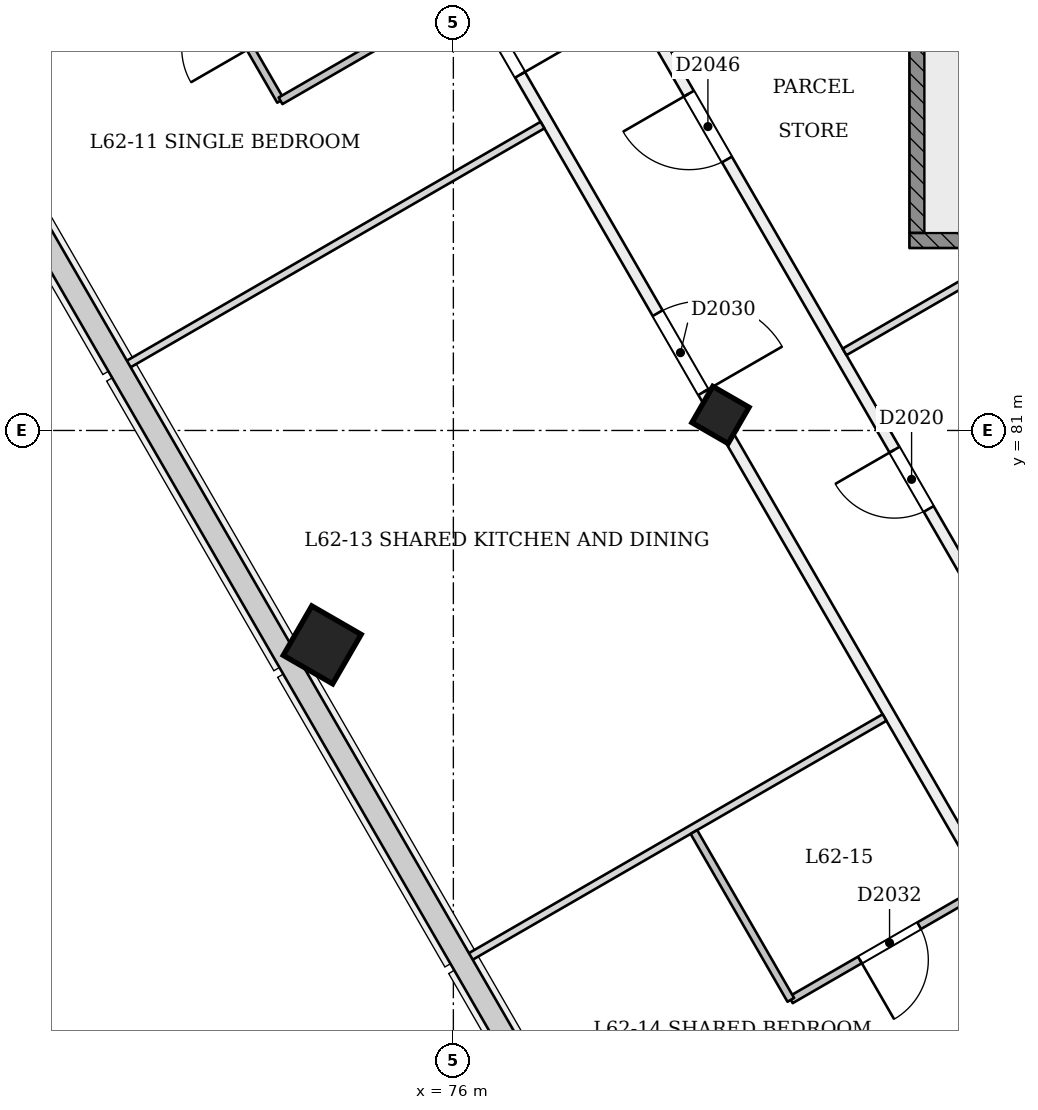
"""IFC4 building model, lengths in metres.
Left out: names, types, materials, properties, quantities, classifications, styles, units other than length and angle.
Written with IfcOpenShell. Run it as: python <this file> out.ifc"""

import sys

from ifc_helpers import new_model, si_unit, direction, frame, frame_2d, origin, origin_2d, place, context, subcontext, project, spatial, rectangle, extrude, element, fill, save


model = new_model("IFC4")
c1 = context("Model", 3, precision=1e-05, world=origin(), true_north=direction((0.0, 1.0)))
c2 = subcontext(c1, "Body", "Model", "MODEL_VIEW")
j1 = project(units=[si_unit("LENGTHUNIT", "METRE"), si_unit("PLANEANGLEUNIT", "RADIAN")], contexts=[c1])
p1 = place(None, origin())
s1 = spatial("IfcSite", under=j1, at=p1, CompositionType="ELEMENT")
p2 = place(p1, origin())
s2 = spatial("IfcBuilding", under=s1, at=p2, CompositionType="ELEMENT")
p3 = place(p2, frame((0.0, 0.0, 242.8)))
s3 = spatial("IfcBuildingStorey", under=s2, at=p3, CompositionType="ELEMENT", Elevation=242.8)
p4 = place(p3, frame((79.487, 81.157, -0.017), z_axis=(0.022153634206, 0.038480930364, 0.999013730882), x_axis=(-0.864982441191, -0.500326600935, 0.038453463149)))
e1 = element("IfcColumn", 1, at=p4, inside=s3, PredefinedType="COLUMN", context=c2, shape_type="SweptSolid", body=[
    extrude(rectangle(XDim=0.55, YDim=0.55, at=origin_2d()), origin(), (0.0, 0.0, 1.0), 3.604),
])
p5 = place(p3, frame((74.248, 78.132, -0.023), z_axis=(0.022222910879, 0.038415824599, 0.999014697916), x_axis=(-0.866024024967, -0.498522986901, 0.038434616057)))
e2 = element("IfcColumn", 2, at=p5, inside=s3, PredefinedType="COLUMN", context=c2, shape_type="SweptSolid", body=[
    extrude(rectangle(XDim=0.75, YDim=0.75, at=origin_2d()), origin(), (0.0, 0.0, 1.0), 3.604),
])
p6 = place(p3, frame((74.036, 90.6, 0.0), z_axis=(0.0, 0.0, 1.0), x_axis=(0.500001028902, -0.866024809747, 0.0)))
e3 = element("IfcWall", 3, at=p6, inside=s3, PredefinedType="PARTITIONING", context=c2, shape_type="SweptSolid", body=[
    extrude(rectangle(XDim=21.798, YDim=0.15, at=frame_2d((10.899, 0.0))), origin(), (0.0, 0.0, 1.0), 2.8),
])
p7 = place(p6, frame((4.682, 0.0, 0.0)))
e4 = element("IfcOpeningElement", 4, at=p7, cuts=e3, PredefinedType="OPENING", context=c2, shape_type="SweptSolid", body=[
    extrude(rectangle(XDim=1.0, YDim=2.1, at=frame_2d((0.5, 1.05))), frame((0.0, 0.085, 0.0), z_axis=(0.0, -1.0, 0.0), x_axis=(1.0, 0.0, 0.0)), (0.0, 0.0, 1.0), 0.171),
])
p8 = place(p6, frame((9.303, 0.0, 0.0)))
e5 = element("IfcOpeningElement", 5, at=p8, cuts=e3, PredefinedType="OPENING", context=c2, shape_type="SweptSolid", body=[
    extrude(rectangle(XDim=1.2, YDim=2.1, at=frame_2d((0.6, 1.05))), frame((0.0, 0.085, 0.0), z_axis=(0.0, -1.0, 0.0), x_axis=(1.0, 0.0, 0.0)), (0.0, 0.0, 1.0), 0.171),
])
p9 = place(p6, frame((18.298, 0.0, 0.0)))
e6 = element("IfcOpeningElement", 6, at=p9, cuts=e3, PredefinedType="OPENING", context=c2, shape_type="SweptSolid", body=[
    extrude(rectangle(XDim=1.0, YDim=2.1, at=frame_2d((0.5, 1.05))), frame((0.0, 0.085, 0.0), z_axis=(0.0, -1.0, 0.0), x_axis=(1.0, 0.0, 0.0)), (0.0, 0.0, 1.0), 0.171),
])
p10 = place(p6, frame((20.15, 0.0, 0.0)))
e7 = element("IfcOpeningElement", 7, at=p10, cuts=e3, PredefinedType="OPENING", context=c2, shape_type="SweptSolid", body=[
    extrude(rectangle(XDim=1.2, YDim=2.1, at=frame_2d((0.6, 1.05))), frame((0.0, 0.085, 0.0), z_axis=(0.0, -1.0, 0.0), x_axis=(1.0, 0.0, 0.0)), (0.0, 0.0, 1.0), 0.171),
])
p11 = place(p3, frame((85.0, 75.21, 0.0), z_axis=(0.0, 0.0, 1.0), x_axis=(-0.499995580497, 0.866027955371, 0.0)))
e8 = element("IfcWall", 8, at=p11, inside=s3, PredefinedType="PARTITIONING", context=c2, shape_type="SweptSolid", body=[
    extrude(rectangle(XDim=17.771, YDim=0.15, at=frame_2d((8.885, 0.0))), origin(), (0.0, 0.0, 1.0), 3.2),
])
p12 = place(p11, frame((14.767, 0.0, 0.0)))
e9 = element("IfcOpeningElement", 9, at=p12, cuts=e8, PredefinedType="OPENING", context=c2, shape_type="SweptSolid", body=[
    extrude(rectangle(XDim=0.9, YDim=2.1, at=frame_2d((0.45, 1.05))), frame((0.0, 0.085, 0.0), z_axis=(0.0, -1.0, 0.0), x_axis=(1.0, 0.0, 0.0)), (0.0, 0.0, 1.0), 0.171),
])
p13 = place(p11, frame((5.493, 0.0, 0.0)))
e10 = element("IfcOpeningElement", 10, at=p13, cuts=e8, PredefinedType="OPENING", context=c2, shape_type="SweptSolid", body=[
    extrude(rectangle(XDim=0.9, YDim=2.1, at=frame_2d((0.45, 1.05))), frame((0.0, 0.085, 0.0), z_axis=(0.0, -1.0, 0.0), x_axis=(1.0, 0.0, 0.0)), (0.0, 0.0, 1.0), 0.171),
])
p14 = place(p11, frame((2.278, 0.0, 0.0)))
e11 = element("IfcOpeningElement", 11, at=p14, cuts=e8, PredefinedType="OPENING", context=c2, shape_type="SweptSolid", body=[
    extrude(rectangle(XDim=1.0, YDim=2.1, at=frame_2d((0.5, 1.05))), frame((0.0, 0.085, 0.0), z_axis=(0.0, -1.0, 0.0), x_axis=(1.0, 0.0, 0.0)), (0.0, 0.0, 1.0), 0.171),
])
p15 = place(p11, frame((10.802, 0.0, 0.0)))
e12 = element("IfcOpeningElement", 12, at=p15, cuts=e8, PredefinedType="OPENING", context=c2, shape_type="SweptSolid", body=[
    extrude(rectangle(XDim=1.0, YDim=2.1, at=frame_2d((0.5, 1.05))), frame((0.0, 0.085, 0.0), z_axis=(0.0, -1.0, 0.0), x_axis=(1.0, 0.0, 0.0)), (0.0, 0.0, 1.0), 0.171),
])
p16 = place(p3, frame((83.513, 83.4, 0.0), z_axis=(0.0, 0.0, 1.0), x_axis=(-0.866068024448, -0.499926171578, 0.0)))
e13 = element("IfcWall", 13, at=p16, inside=s3, PredefinedType="PARTITIONING", context=c2, shape_type="SweptSolid", body=[
    extrude(rectangle(XDim=2.732, YDim=0.1, at=frame_2d((1.366, 0.0))), origin(), (0.0, 0.0, 1.0), 3.2),
])
p17 = place(p3, frame((73.726, 85.337, 0.0), z_axis=(0.0, 0.0, 1.0), x_axis=(-0.500004234368, 0.866022959057, 0.0)))
e14 = element("IfcWall", 14, at=p17, inside=s3, PredefinedType="PARTITIONING", context=c2, shape_type="SweptSolid", body=[
    extrude(rectangle(XDim=5.0, YDim=0.1, at=frame_2d((2.5, 0.0))), origin(), (0.0, 0.0, 1.0), 2.8),
])
p18 = place(p17, frame((3.253, 0.0, 0.0)))
e15 = element("IfcOpeningElement", 15, at=p18, cuts=e14, PredefinedType="OPENING", context=c2, shape_type="SweptSolid", body=[
    extrude(rectangle(XDim=0.9, YDim=2.1, at=frame_2d((0.45, 1.05))), frame((0.0, 0.061, 0.0), z_axis=(0.0, -1.0, 0.0), x_axis=(1.0, 0.0, 0.0)), (0.0, 0.0, 1.0), 0.121),
])
p19 = place(p17, frame((0.8, 0.0, 0.0)))
e16 = element("IfcOpeningElement", 16, at=p19, cuts=e14, PredefinedType="OPENING", context=c2, shape_type="SweptSolid", body=[
    extrude(rectangle(XDim=0.9, YDim=2.1, at=frame_2d((0.45, 1.05))), frame((0.0, 0.061, 0.0), z_axis=(0.0, -1.0, 0.0), x_axis=(1.0, 0.0, 0.0)), (0.0, 0.0, 1.0), 0.121),
])
p20 = place(p3, frame((69.445, 85.752, 0.0), z_axis=(0.0, 0.0, 1.0), x_axis=(0.866013532718, 0.500020560727, 0.0)))
e17 = element("IfcWall", 17, at=p20, inside=s3, PredefinedType="PARTITIONING", context=c2, shape_type="SweptSolid", body=[
    extrude(rectangle(XDim=3.45, YDim=0.15, at=frame_2d((1.725, 0.0))), origin(), (0.0, 0.0, 1.0), 2.7),
])
p21 = place(p3, frame((76.173, 86.75, 0.0), z_axis=(0.0, 0.0, 1.0), x_axis=(-0.866048868473, -0.499959355765, 0.0)))
e18 = element("IfcWall", 18, at=p21, inside=s3, PredefinedType="PARTITIONING", context=c2, shape_type="SweptSolid", body=[
    extrude(rectangle(XDim=2.825, YDim=0.1, at=frame_2d((1.413, 0.0))), origin(), (0.0, 0.0, 1.0), 3.2),
])
for number, where, z_axis, x_axis in (
    (19, (71.677, 81.845, 0.0), (0.0, 0.0, 1.0), (0.866, 0.5, 0.0)),
    (20, (76.177, 74.051, 0.0), (0.0, 0.0, 1.0), (0.866, 0.5, 0.0)),
):
    element("IfcWall", number, at=place(p3, frame(where, z_axis=z_axis, x_axis=x_axis)), inside=s3, PredefinedType="PARTITIONING", context=c2, shape_type="SweptSolid", body=[
        extrude(rectangle(XDim=6.345, YDim=0.1, at=frame_2d((3.173, 0.0))), origin(), (0.0, 0.0, 1.0), 2.7),
    ])
p22 = place(p3, frame((82.973, 74.972, 0.0), z_axis=(0.0, 0.0, 1.0), x_axis=(-0.866046596414, -0.499963291492, 0.0)))
e21 = element("IfcWall", 21, at=p22, inside=s3, PredefinedType="PARTITIONING", context=c2, shape_type="SweptSolid", body=[
    extrude(rectangle(XDim=2.925, YDim=0.1, at=frame_2d((1.462, 0.0))), origin(), (0.0, 0.0, 1.0), 3.2),
])
p23 = place(p22, frame((0.975, 0.0, 0.0)))
e22 = element("IfcOpeningElement", 22, at=p23, cuts=e21, PredefinedType="OPENING", context=c2, shape_type="SweptSolid", body=[
    extrude(rectangle(XDim=0.9, YDim=2.1, at=frame_2d((0.45, 1.05))), frame((0.0, 0.061, 0.0), z_axis=(0.0, -1.0, 0.0), x_axis=(1.0, 0.0, 0.0)), (0.0, 0.0, 1.0), 0.121),
])
p24 = place(p3, frame((80.439, 73.509, 0.0), z_axis=(0.0, 0.0, 1.0), x_axis=(-0.499990435942, 0.866030925526, 0.0)))
e23 = element("IfcWall", 23, at=p24, inside=s3, PredefinedType="PARTITIONING", context=c2, shape_type="SweptSolid", body=[
    extrude(rectangle(XDim=2.55, YDim=0.1, at=frame_2d((1.275, 0.0))), origin(), (0.0, 0.0, 1.0), 3.2),
])
p25 = place(p3, frame((78.445, 70.164, 0.0), z_axis=(0.0, 0.0, 1.0), x_axis=(0.866032601554, 0.49998753289, 0.0)))
e24 = element("IfcWall", 24, at=p25, inside=s3, PredefinedType="PARTITIONING", context=c2, shape_type="SweptSolid", body=[
    extrude(rectangle(XDim=6.325, YDim=0.15, at=frame_2d((3.163, 0.0))), origin(), (0.0, 0.0, 1.0), 2.7),
])
p26 = place(p3, frame((82.0, 83.5, 0.0), z_axis=(0.0, 0.0, 1.0), x_axis=(1.0, 0.0, 0.0)))
e25 = element("IfcWall", 25, at=p26, inside=s3, PredefinedType="SOLIDWALL", context=c2, shape_type="SweptSolid", body=[
    extrude(rectangle(XDim=6.0, YDim=0.2, at=frame_2d((3.0, 0.0))), origin(), (0.0, 0.0, 1.0), 3.2),
])
p27 = place(p3, frame((82.1, 83.6, 0.0), z_axis=(0.0, 0.0, 1.0), x_axis=(0.0, 1.0, 0.0)))
e26 = element("IfcWall", 26, at=p27, inside=s3, PredefinedType="SOLIDWALL", context=c2, shape_type="SweptSolid", body=[
    extrude(rectangle(XDim=6.8, YDim=0.2, at=frame_2d((3.4, 0.0))), origin(), (0.0, 0.0, 1.0), 3.2),
])
p28 = place(p13, origin())
e27 = element("IfcDoor", 27, at=p28, inside=s3, OperationType="SINGLE_SWING_RIGHT", PredefinedType="NOTDEFINED", context=c2, shape_type="SweptSolid", body=[
    extrude(rectangle(XDim=0.9, YDim=2.1, at=frame_2d((0.45, 1.05))), frame((0.0, 0.025, 0.0), z_axis=(0.0, -1.0, 0.0), x_axis=(1.0, 0.0, 0.0)), (0.0, 0.0, 1.0), 0.05),
])
fill(e10, e27)
p29 = place(p7, origin())
e28 = element("IfcDoor", 28, at=p29, inside=s3, OperationType="SINGLE_SWING_RIGHT", PredefinedType="NOTDEFINED", context=c2, shape_type="SweptSolid", body=[
    extrude(rectangle(XDim=1.0, YDim=2.1, at=frame_2d((0.5, 1.05))), frame((0.0, 0.025, 0.0), z_axis=(0.0, -1.0, 0.0), x_axis=(1.0, 0.0, 0.0)), (0.0, 0.0, 1.0), 0.05),
])
fill(e4, e28)
p30 = place(p8, origin())
e29 = element("IfcDoor", 29, at=p30, inside=s3, OperationType="SINGLE_SWING_RIGHT", PredefinedType="NOTDEFINED", context=c2, shape_type="SweptSolid", body=[
    extrude(rectangle(XDim=1.2, YDim=2.1, at=frame_2d((0.6, 1.05))), frame((0.0, 0.025, 0.0), z_axis=(0.0, -1.0, 0.0), x_axis=(1.0, 0.0, 0.0)), (0.0, 0.0, 1.0), 0.05),
])
fill(e5, e29)
p31 = place(p23, origin())
e30 = element("IfcDoor", 30, at=p31, inside=s3, OperationType="SINGLE_SWING_RIGHT", PredefinedType="NOTDEFINED", context=c2, shape_type="SweptSolid", body=[
    extrude(rectangle(XDim=0.9, YDim=2.1, at=frame_2d((0.45, 1.05))), frame((0.0, 0.025, 0.0), z_axis=(0.0, -1.0, 0.0), x_axis=(1.0, 0.0, 0.0)), (0.0, 0.0, 1.0), 0.05),
])
fill(e22, e30)
p32 = place(p15, origin())
e31 = element("IfcDoor", 31, at=p32, inside=s3, OperationType="SINGLE_SWING_RIGHT", PredefinedType="NOTDEFINED", context=c2, shape_type="SweptSolid", body=[
    extrude(rectangle(XDim=1.0, YDim=2.1, at=frame_2d((0.5, 1.05))), frame((0.0, 0.025, 0.0), z_axis=(0.0, -1.0, 0.0), x_axis=(1.0, 0.0, 0.0)), (0.0, 0.0, 1.0), 0.05),
])
fill(e12, e31)
save(model, sys.argv[1])
